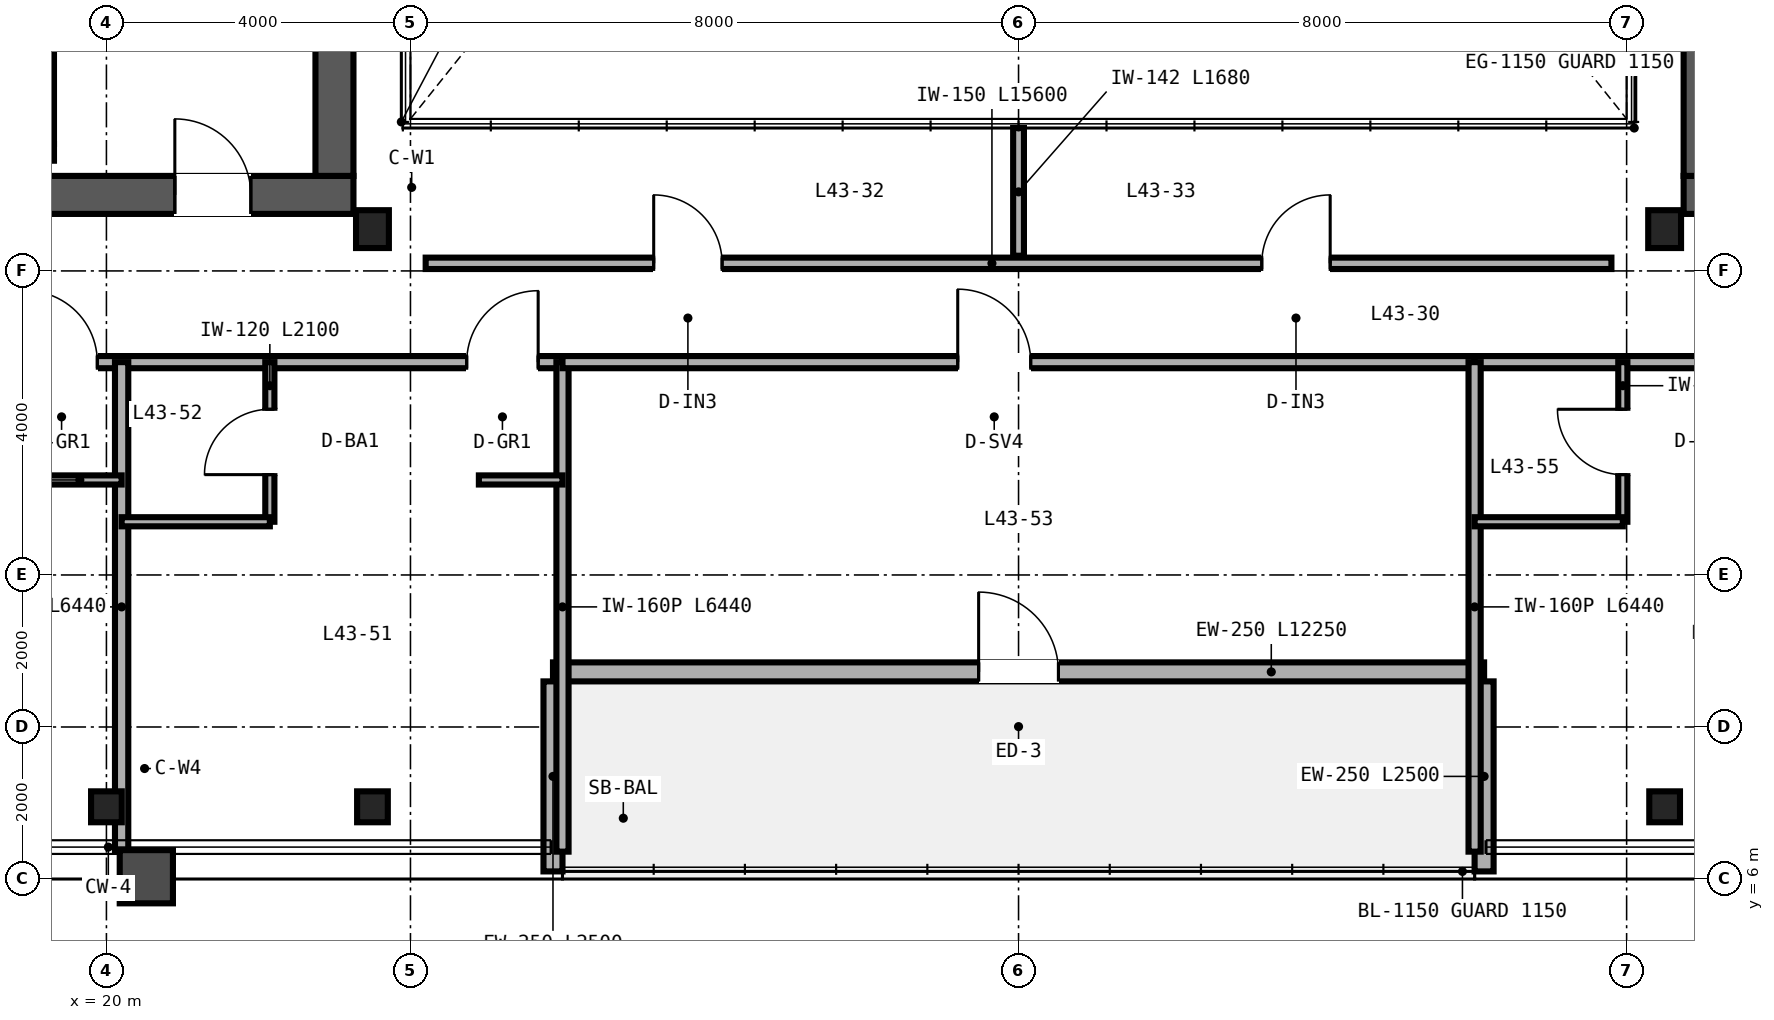
"""IFC4 building model, lengths in metres.
Left out: names, types, materials, properties, quantities, classifications, styles, units other than length and angle.
Written with IfcOpenShell. Run it as: python <this file> out.ifc"""

import sys

from ifc_helpers import new_model, si_unit, direction, frame, frame_2d, origin, origin_2d, place, context, subcontext, project, spatial, rectangle, i_section, extrude, source, transform, mapped, element, fill, save


model = new_model("IFC4")
c1 = context("Model", 3, precision=1e-05, world=origin(), true_north=direction((0.0, 1.0)))
c2 = subcontext(c1, "Body", "Model", "MODEL_VIEW")
j1 = project(units=[si_unit("LENGTHUNIT", "METRE"), si_unit("PLANEANGLEUNIT", "RADIAN")], contexts=[c1])
p1 = place(None, origin())
s1 = spatial("IfcSite", under=j1, at=p1, CompositionType="ELEMENT")
p2 = place(p1, origin())
s2 = spatial("IfcBuilding", under=s1, at=p2, CompositionType="ELEMENT")
p3 = place(p2, frame((0.0, 0.0, 174.0)))
s3 = spatial("IfcBuildingStorey", under=s2, at=p3, CompositionType="ELEMENT", Elevation=174.0)
p4 = place(p3, frame((10.75, 15.0, 0.0), z_axis=(0.0, 0.0, 1.0), x_axis=(1.0, 0.0, 0.0)))
e1 = element("IfcWall", 1, at=p4, inside=s3, PredefinedType="SHEAR", context=c2, shape_type="SweptSolid", body=[
    extrude(rectangle(XDim=12.5, YDim=0.5, at=frame_2d((6.25, 0.0))), origin(), (0.0, 0.0, 1.0), 3.37),
])
p5 = place(p4, frame((10.15, 0.0, 0.0)))
e2 = element("IfcOpeningElement", 2, at=p5, cuts=e1, PredefinedType="OPENING", context=c2, shape_type="SweptSolid", body=[
    extrude(rectangle(XDim=1.0, YDim=2.15, at=frame_2d((0.5, 1.075))), frame((0.0, 0.26, 0.0), z_axis=(0.0, -1.0, 0.0), x_axis=(1.0, 0.0, 0.0)), (0.0, 0.0, 1.0), 0.52),
])
p6 = place(p3, frame((23.0, 15.25, 0.0), z_axis=(0.0, 0.0, 1.0), x_axis=(0.0, 1.0, 0.0)))
e3 = element("IfcWall", 3, at=p6, inside=s3, PredefinedType="SHEAR", context=c2, shape_type="SweptSolid", body=[
    extrude(rectangle(XDim=21.5, YDim=0.5, at=frame_2d((10.75, 0.0))), origin(), (0.0, 0.0, 1.0), 3.37),
])
p7 = place(p3, frame((40.75, 15.0, 0.0), z_axis=(0.0, 0.0, 1.0), x_axis=(1.0, 0.0, 0.0)))
e4 = element("IfcWall", 4, at=p7, inside=s3, PredefinedType="SHEAR", context=c2, shape_type="SweptSolid", body=[
    extrude(rectangle(XDim=12.5, YDim=0.5, at=frame_2d((6.25, 0.0))), origin(), (0.0, 0.0, 1.0), 3.37),
])
p8 = place(p7, frame((4.35, 0.0, 0.0)))
e5 = element("IfcOpeningElement", 5, at=p8, cuts=e4, PredefinedType="OPENING", context=c2, shape_type="SweptSolid", body=[
    extrude(rectangle(XDim=1.0, YDim=2.15, at=frame_2d((0.5, 1.075))), frame((0.0, 0.26, 0.0), z_axis=(0.0, -1.0, 0.0), x_axis=(1.0, 0.0, 0.0)), (0.0, 0.0, 1.0), 0.52),
])
p9 = place(p3, frame((41.0, 15.25, 0.0), z_axis=(0.0, 0.0, 1.0), x_axis=(0.0, 1.0, 0.0)))
e6 = element("IfcWall", 6, at=p9, inside=s3, PredefinedType="SHEAR", context=c2, shape_type="SweptSolid", body=[
    extrude(rectangle(XDim=21.5, YDim=0.5, at=frame_2d((10.75, 0.0))), origin(), (0.0, 0.0, 1.0), 3.37),
])
p10 = place(p3, frame((11.25, 15.56, 0.0), z_axis=(0.0, 0.0, 1.0), x_axis=(1.0, 0.0, 0.0)))
e7 = element("IfcWall", 7, at=p10, inside=s3, PredefinedType="SHEAR", context=c2, shape_type="SweptSolid", body=[
    extrude(rectangle(XDim=8.06, YDim=0.22, at=frame_2d((4.03, 0.0))), origin(), (0.0, 0.0, 1.0), 3.4),
])
p11 = place(p3, frame((19.2, 15.67, 0.0), z_axis=(0.0, 0.0, 1.0), x_axis=(0.0, 1.0, 0.0)))
e8 = element("IfcWall", 8, at=p11, inside=s3, PredefinedType="SHEAR", context=c2, shape_type="SweptSolid", body=[
    extrude(rectangle(XDim=3.28, YDim=0.22, at=frame_2d((1.64, 0.0))), origin(), (0.0, 0.0, 1.0), 3.4),
])
m1 = source(origin(), c2, "Body", "SweptSolid", [
    extrude(i_section(OverallWidth=0.432, OverallDepth=0.498, WebThickness=0.056, FlangeThickness=0.089, FilletRadius=0.025, at=origin_2d()), origin(), (0.0, 0.0, 1.0), 3.37),
])
for number, where, z_axis, x_axis in (
    (9, (23.5, 14.55, 0.0), (0.0, 0.0, 1.0), (1.0, 0.0, 0.0)),
    (10, (40.5, 14.55, 0.0), (0.0, 0.0, 1.0), (1.0, 0.0, 0.0)),
):
    element("IfcColumn", number, at=place(p3, frame(where, z_axis=z_axis, x_axis=x_axis)), inside=s3, PredefinedType="COLUMN", context=c2, shape_type="MappedRepresentation", body=[
        mapped(m1, transform((0.0, 0.0, 0.0), scale=1.0)),
    ])
m2 = source(origin(), c2, "Body", "SweptSolid", [
    extrude(i_section(OverallWidth=0.404, OverallDepth=0.407, WebThickness=0.027, FlangeThickness=0.044, FilletRadius=0.025, at=origin_2d()), origin(), (0.0, 0.0, 1.0), 3.37),
])
for number, where, z_axis, x_axis in (
    (11, (20.0, 6.95, 0.0), (0.0, 0.0, 1.0), (1.0, 0.0, 0.0)),
    (12, (23.5, 6.95, 0.0), (0.0, 0.0, 1.0), (1.0, 0.0, 0.0)),
    (13, (40.5, 6.95, 0.0), (0.0, 0.0, 1.0), (1.0, 0.0, 0.0)),
):
    element("IfcColumn", number, at=place(p3, frame(where, z_axis=z_axis, x_axis=x_axis)), inside=s3, PredefinedType="COLUMN", context=c2, shape_type="MappedRepresentation", body=[
        mapped(m2, transform((0.0, 0.0, 0.0), scale=1.0)),
    ])
p12 = place(p3, frame((25.875, 8.725, 0.0), z_axis=(0.0, 0.0, 1.0), x_axis=(1.0, 0.0, 0.0)))
e14 = element("IfcWall", 14, at=p12, inside=s3, PredefinedType="SOLIDWALL", context=c2, shape_type="SweptSolid", body=[
    extrude(rectangle(XDim=12.25, YDim=0.25, at=frame_2d((6.125, 0.0))), origin(), (0.0, 0.0, 1.0), 3.37),
])
p13 = place(p12, frame((5.6, 0.0, 0.0)))
e15 = element("IfcOpeningElement", 15, at=p13, cuts=e14, PredefinedType="OPENING", context=c2, shape_type="SweptSolid", body=[
    extrude(rectangle(XDim=1.05, YDim=2.15, at=frame_2d((0.525, 1.075))), frame((0.0, 0.135, 0.0), z_axis=(0.0, -1.0, 0.0), x_axis=(1.0, 0.0, 0.0)), (0.0, 0.0, 1.0), 0.27),
])
for number, where, z_axis, x_axis in (
    (16, (25.875, 6.1, 0.0), (0.0, 0.0, 1.0), (0.0, 1.0, 0.0)),
    (17, (38.125, 6.1, 0.0), (0.0, 0.0, 1.0), (0.0, 1.0, 0.0)),
):
    element("IfcWall", number, at=place(p3, frame(where, z_axis=z_axis, x_axis=x_axis)), inside=s3, PredefinedType="SOLIDWALL", context=c2, shape_type="SweptSolid", body=[
        extrude(rectangle(XDim=2.5, YDim=0.25, at=frame_2d((1.25, 0.0))), origin(), (0.0, 0.0, 1.0), 2.443),
    ])
p14 = place(p3, frame((24.2, 14.1, 0.0), z_axis=(0.0, 0.0, 1.0), x_axis=(1.0, 0.0, 0.0)))
e18 = element("IfcWall", 18, at=p14, inside=s3, PredefinedType="PARTITIONING", context=c2, shape_type="SweptSolid", body=[
    extrude(rectangle(XDim=15.6, YDim=0.15, at=frame_2d((7.8, 0.0))), origin(), (0.0, 0.0, 1.0), 3.37),
])
p15 = place(p14, frame((3.0, 0.0, 0.0)))
e19 = element("IfcOpeningElement", 19, at=p15, cuts=e18, PredefinedType="OPENING", context=c2, shape_type="SweptSolid", body=[
    extrude(rectangle(XDim=0.9, YDim=2.15, at=frame_2d((0.45, 1.075))), frame((0.0, 0.085, 0.0), z_axis=(0.0, -1.0, 0.0), x_axis=(1.0, 0.0, 0.0)), (0.0, 0.0, 1.0), 0.17),
])
p16 = place(p14, frame((11.0, 0.0, 0.0)))
e20 = element("IfcOpeningElement", 20, at=p16, cuts=e18, PredefinedType="OPENING", context=c2, shape_type="SweptSolid", body=[
    extrude(rectangle(XDim=0.9, YDim=2.15, at=frame_2d((0.45, 1.075))), frame((0.0, 0.085, 0.0), z_axis=(0.0, -1.0, 0.0), x_axis=(1.0, 0.0, 0.0)), (0.0, 0.0, 1.0), 0.17),
])
p17 = place(p3, frame((32.0, 14.2, 0.0), z_axis=(0.0, 0.0, 1.0), x_axis=(0.0, 1.0, 0.0)))
e21 = element("IfcWall", 21, at=p17, inside=s3, PredefinedType="PARTITIONING", context=c2, shape_type="SweptSolid", body=[
    extrude(rectangle(XDim=1.68, YDim=0.142, at=frame_2d((0.84, 0.0))), origin(), (0.0, 0.0, 1.0), 3.37),
])
p18 = place(p3, frame((14.0, 12.8, 0.0), z_axis=(0.0, 0.0, 1.0), x_axis=(1.0, 0.0, 0.0)))
e22 = element("IfcWall", 22, at=p18, inside=s3, PredefinedType="PARTITIONING", context=c2, shape_type="SweptSolid", body=[
    extrude(rectangle(XDim=12.0, YDim=0.16, at=frame_2d((6.0, 0.0))), origin(), (0.0, 0.0, 1.0), 2.913),
])
p19 = place(p18, frame((4.94, 0.0, 0.0)))
e23 = element("IfcOpeningElement", 23, at=p19, cuts=e22, PredefinedType="OPENING", context=c2, shape_type="SweptSolid", body=[
    extrude(rectangle(XDim=0.94, YDim=2.15, at=frame_2d((0.47, 1.075))), frame((0.0, 0.09, 0.0), z_axis=(0.0, -1.0, 0.0), x_axis=(1.0, 0.0, 0.0)), (0.0, 0.0, 1.0), 0.18),
])
p20 = place(p18, frame((10.74, 0.0, 0.0)))
e24 = element("IfcOpeningElement", 24, at=p20, cuts=e22, PredefinedType="OPENING", context=c2, shape_type="SweptSolid", body=[
    extrude(rectangle(XDim=0.94, YDim=2.15, at=frame_2d((0.47, 1.075))), frame((0.0, 0.09, 0.0), z_axis=(0.0, -1.0, 0.0), x_axis=(1.0, 0.0, 0.0)), (0.0, 0.0, 1.0), 0.18),
])
p21 = place(p3, frame((26.0, 6.36, 0.0), z_axis=(0.0, 0.0, 1.0), x_axis=(0.0, 1.0, 0.0)))
e25 = element("IfcWall", 25, at=p21, inside=s3, PredefinedType="PARTITIONING", context=c2, shape_type="SweptSolid", body=[
    extrude(rectangle(XDim=6.44, YDim=0.16, at=frame_2d((3.22, 0.0))), origin(), (0.0, 0.0, 1.0), 2.443),
])
p22 = place(p3, frame((20.2, 6.36, 0.0), z_axis=(0.0, 0.0, 1.0), x_axis=(0.0, 1.0, 0.0)))
e26 = element("IfcWall", 26, at=p22, inside=s3, PredefinedType="PARTITIONING", context=c2, shape_type="SweptSolid", body=[
    extrude(rectangle(XDim=6.44, YDim=0.175, at=frame_2d((3.22, 0.0))), origin(), (0.0, 0.0, 1.0), 2.677),
])
p23 = place(p3, frame((19.1, 11.25, 0.0), z_axis=(0.0, 0.0, 1.0), x_axis=(1.0, 0.0, 0.0)))
e27 = element("IfcWall", 27, at=p23, inside=s3, PredefinedType="PARTITIONING", context=c2, shape_type="SweptSolid", body=[
    extrude(rectangle(XDim=1.1, YDim=0.12, at=frame_2d((0.55, 0.0))), origin(), (0.0, 0.0, 1.0), 3.37),
])
p24 = place(p3, frame((22.15, 10.7, 0.0), z_axis=(0.0, 0.0, 1.0), x_axis=(0.0, 1.0, 0.0)))
e28 = element("IfcWall", 28, at=p24, inside=s3, PredefinedType="PARTITIONING", context=c2, shape_type="SweptSolid", body=[
    extrude(rectangle(XDim=2.1, YDim=0.12, at=frame_2d((1.05, 0.0))), origin(), (0.0, 0.0, 1.0), 3.37),
])
p25 = place(p24, frame((0.62, 0.0, 0.0)))
e29 = element("IfcOpeningElement", 29, at=p25, cuts=e28, PredefinedType="OPENING", context=c2, shape_type="SweptSolid", body=[
    extrude(rectangle(XDim=0.86, YDim=2.1, at=frame_2d((0.43, 1.05))), frame((0.0, 0.07, 0.0), z_axis=(0.0, -1.0, 0.0), x_axis=(1.0, 0.0, 0.0)), (0.0, 0.0, 1.0), 0.14),
])
p26 = place(p3, frame((20.2, 10.7, 0.0), z_axis=(0.0, 0.0, 1.0), x_axis=(1.0, 0.0, 0.0)))
e30 = element("IfcWall", 30, at=p26, inside=s3, PredefinedType="PARTITIONING", context=c2, shape_type="SweptSolid", body=[
    extrude(rectangle(XDim=1.95, YDim=0.12, at=frame_2d((0.975, 0.0))), origin(), (0.0, 0.0, 1.0), 3.37),
])
p27 = place(p3, frame((24.9, 11.25, 0.0), z_axis=(0.0, 0.0, 1.0), x_axis=(1.0, 0.0, 0.0)))
e31 = element("IfcWall", 31, at=p27, inside=s3, PredefinedType="PARTITIONING", context=c2, shape_type="SweptSolid", body=[
    extrude(rectangle(XDim=1.1, YDim=0.12, at=frame_2d((0.55, 0.0))), origin(), (0.0, 0.0, 1.0), 3.37),
])
p28 = place(p3, frame((26.0, 12.8, 0.0), z_axis=(0.0, 0.0, 1.0), x_axis=(1.0, 0.0, 0.0)))
e32 = element("IfcWall", 32, at=p28, inside=s3, PredefinedType="PARTITIONING", context=c2, shape_type="SweptSolid", body=[
    extrude(rectangle(XDim=12.0, YDim=0.16, at=frame_2d((6.0, 0.0))), origin(), (0.0, 0.0, 1.0), 3.37),
])
p29 = place(p28, frame((5.2, 0.0, 0.0)))
e33 = element("IfcOpeningElement", 33, at=p29, cuts=e32, PredefinedType="OPENING", context=c2, shape_type="SweptSolid", body=[
    extrude(rectangle(XDim=0.96, YDim=2.15, at=frame_2d((0.48, 1.075))), frame((0.0, 0.09, 0.0), z_axis=(0.0, -1.0, 0.0), x_axis=(1.0, 0.0, 0.0)), (0.0, 0.0, 1.0), 0.18),
])
p30 = place(p3, frame((38.0, 12.8, 0.0), z_axis=(0.0, 0.0, 1.0), x_axis=(1.0, 0.0, 0.0)))
e34 = element("IfcWall", 34, at=p30, inside=s3, PredefinedType="PARTITIONING", context=c2, shape_type="SweptSolid", body=[
    extrude(rectangle(XDim=12.0, YDim=0.16, at=frame_2d((6.0, 0.0))), origin(), (0.0, 0.0, 1.0), 2.913),
])
p31 = place(p30, frame((4.94, 0.0, 0.0)))
e35 = element("IfcOpeningElement", 35, at=p31, cuts=e34, PredefinedType="OPENING", context=c2, shape_type="SweptSolid", body=[
    extrude(rectangle(XDim=0.94, YDim=2.15, at=frame_2d((0.47, 1.075))), frame((0.0, 0.09, 0.0), z_axis=(0.0, -1.0, 0.0), x_axis=(1.0, 0.0, 0.0)), (0.0, 0.0, 1.0), 0.18),
])
p32 = place(p30, frame((10.74, 0.0, 0.0)))
e36 = element("IfcOpeningElement", 36, at=p32, cuts=e34, PredefinedType="OPENING", context=c2, shape_type="SweptSolid", body=[
    extrude(rectangle(XDim=0.94, YDim=2.15, at=frame_2d((0.47, 1.075))), frame((0.0, 0.09, 0.0), z_axis=(0.0, -1.0, 0.0), x_axis=(1.0, 0.0, 0.0)), (0.0, 0.0, 1.0), 0.18),
])
p33 = place(p3, frame((38.0, 6.36, 0.0), z_axis=(0.0, 0.0, 1.0), x_axis=(0.0, 1.0, 0.0)))
e37 = element("IfcWall", 37, at=p33, inside=s3, PredefinedType="PARTITIONING", context=c2, shape_type="SweptSolid", body=[
    extrude(rectangle(XDim=6.44, YDim=0.16, at=frame_2d((3.22, 0.0))), origin(), (0.0, 0.0, 1.0), 2.443),
])
p34 = place(p3, frame((39.95, 10.7, 0.0), z_axis=(0.0, 0.0, 1.0), x_axis=(0.0, 1.0, 0.0)))
e38 = element("IfcWall", 38, at=p34, inside=s3, PredefinedType="PARTITIONING", context=c2, shape_type="SweptSolid", body=[
    extrude(rectangle(XDim=2.1, YDim=0.12, at=frame_2d((1.05, 0.0))), origin(), (0.0, 0.0, 1.0), 3.37),
])
p35 = place(p34, frame((0.62, 0.0, 0.0)))
e39 = element("IfcOpeningElement", 39, at=p35, cuts=e38, PredefinedType="OPENING", context=c2, shape_type="SweptSolid", body=[
    extrude(rectangle(XDim=0.86, YDim=2.1, at=frame_2d((0.43, 1.05))), frame((0.0, 0.07, 0.0), z_axis=(0.0, -1.0, 0.0), x_axis=(1.0, 0.0, 0.0)), (0.0, 0.0, 1.0), 0.14),
])
p36 = place(p3, frame((38.0, 10.7, 0.0), z_axis=(0.0, 0.0, 1.0), x_axis=(1.0, 0.0, 0.0)))
e40 = element("IfcWall", 40, at=p36, inside=s3, PredefinedType="PARTITIONING", context=c2, shape_type="SweptSolid", body=[
    extrude(rectangle(XDim=1.95, YDim=0.12, at=frame_2d((0.975, 0.0))), origin(), (0.0, 0.0, 1.0), 3.37),
])
m3 = source(origin(), c2, "Body", "SweptSolid", [
    extrude(rectangle(XDim=1.05, YDim=2.15, at=frame_2d((0.525, 1.075))), frame((0.0, 0.025, 0.0), z_axis=(0.0, -1.0, 0.0), x_axis=(1.0, 0.0, 0.0)), (0.0, 0.0, 1.0), 0.05),
])
p37 = place(p13, origin())
e41 = element("IfcDoor", 41, at=p37, inside=s3, OperationType="SINGLE_SWING_LEFT", PredefinedType="DOOR", context=c2, shape_type="MappedRepresentation", body=[
    mapped(m3, transform((0.0, 0.0, 0.0), scale=1.0)),
])
fill(e15, e41)
m4 = source(origin(), c2, "Body", "SweptSolid", [
    extrude(rectangle(XDim=1.0, YDim=2.15, at=frame_2d((0.5, 1.075))), frame((0.0, 0.025, 0.0), z_axis=(0.0, -1.0, 0.0), x_axis=(1.0, 0.0, 0.0)), (0.0, 0.0, 1.0), 0.05),
])
p38 = place(p5, origin())
e42 = element("IfcDoor", 42, at=p38, inside=s3, OperationType="SINGLE_SWING_LEFT", PredefinedType="DOOR", context=c2, shape_type="MappedRepresentation", body=[
    mapped(m4, transform((0.0, 0.0, 0.0), scale=1.0)),
])
fill(e2, e42)
m5 = source(origin(), c2, "Body", "SweptSolid", [
    extrude(rectangle(XDim=0.9, YDim=2.15, at=frame_2d((0.45, 1.075))), frame((0.0, 0.025, 0.0), z_axis=(0.0, -1.0, 0.0), x_axis=(1.0, 0.0, 0.0)), (0.0, 0.0, 1.0), 0.05),
])
p39 = place(p15, origin())
e43 = element("IfcDoor", 43, at=p39, inside=s3, OperationType="SINGLE_SWING_LEFT", PredefinedType="DOOR", context=c2, shape_type="MappedRepresentation", body=[
    mapped(m5, transform((0.0, 0.0, 0.0), scale=1.0)),
])
fill(e19, e43)
p40 = place(p16, origin())
e44 = element("IfcDoor", 44, at=p40, inside=s3, OperationType="SINGLE_SWING_RIGHT", PredefinedType="DOOR", context=c2, shape_type="MappedRepresentation", body=[
    mapped(m5, transform((0.0, 0.0, 0.0), scale=1.0)),
])
fill(e20, e44)
m6 = source(origin(), c2, "Body", "SweptSolid", [
    extrude(rectangle(XDim=0.86, YDim=2.1, at=frame_2d((0.43, 1.05))), frame((0.0, 0.025, 0.0), z_axis=(0.0, -1.0, 0.0), x_axis=(1.0, 0.0, 0.0)), (0.0, 0.0, 1.0), 0.05),
])
p41 = place(p25, origin())
e45 = element("IfcDoor", 45, at=p41, inside=s3, OperationType="SINGLE_SWING_LEFT", PredefinedType="DOOR", context=c2, shape_type="MappedRepresentation", body=[
    mapped(m6, transform((0.0, 0.0, 0.0), scale=1.0)),
])
fill(e29, e45)
m7 = source(origin(), c2, "Body", "SweptSolid", [
    extrude(rectangle(XDim=0.94, YDim=2.15, at=frame_2d((0.47, 1.075))), frame((0.0, 0.025, 0.0), z_axis=(0.0, -1.0, 0.0), x_axis=(1.0, 0.0, 0.0)), (0.0, 0.0, 1.0), 0.05),
])
p42 = place(p19, origin())
e46 = element("IfcDoor", 46, at=p42, inside=s3, OperationType="SINGLE_SWING_LEFT", PredefinedType="DOOR", context=c2, shape_type="MappedRepresentation", body=[
    mapped(m7, transform((0.0, 0.0, 0.0), scale=1.0)),
])
fill(e23, e46)
p43 = place(p20, origin())
e47 = element("IfcDoor", 47, at=p43, inside=s3, OperationType="SINGLE_SWING_RIGHT", PredefinedType="DOOR", context=c2, shape_type="MappedRepresentation", body=[
    mapped(m7, transform((0.0, 0.0, 0.0), scale=1.0)),
])
fill(e24, e47)
m8 = source(origin(), c2, "Body", "SweptSolid", [
    extrude(rectangle(XDim=0.96, YDim=2.15, at=frame_2d((0.48, 1.075))), frame((0.0, 0.025, 0.0), z_axis=(0.0, -1.0, 0.0), x_axis=(1.0, 0.0, 0.0)), (0.0, 0.0, 1.0), 0.05),
])
p44 = place(p29, origin())
e48 = element("IfcDoor", 48, at=p44, inside=s3, OperationType="SINGLE_SWING_LEFT", PredefinedType="DOOR", context=c2, shape_type="MappedRepresentation", body=[
    mapped(m8, transform((0.0, 0.0, 0.0), scale=1.0)),
])
fill(e33, e48)
p45 = place(p35, origin())
e49 = element("IfcDoor", 49, at=p45, inside=s3, OperationType="SINGLE_SWING_RIGHT", PredefinedType="DOOR", context=c2, shape_type="MappedRepresentation", body=[
    mapped(m6, transform((0.0, 0.0, 0.0), scale=1.0)),
])
fill(e39, e49)
save(model, sys.argv[1])
